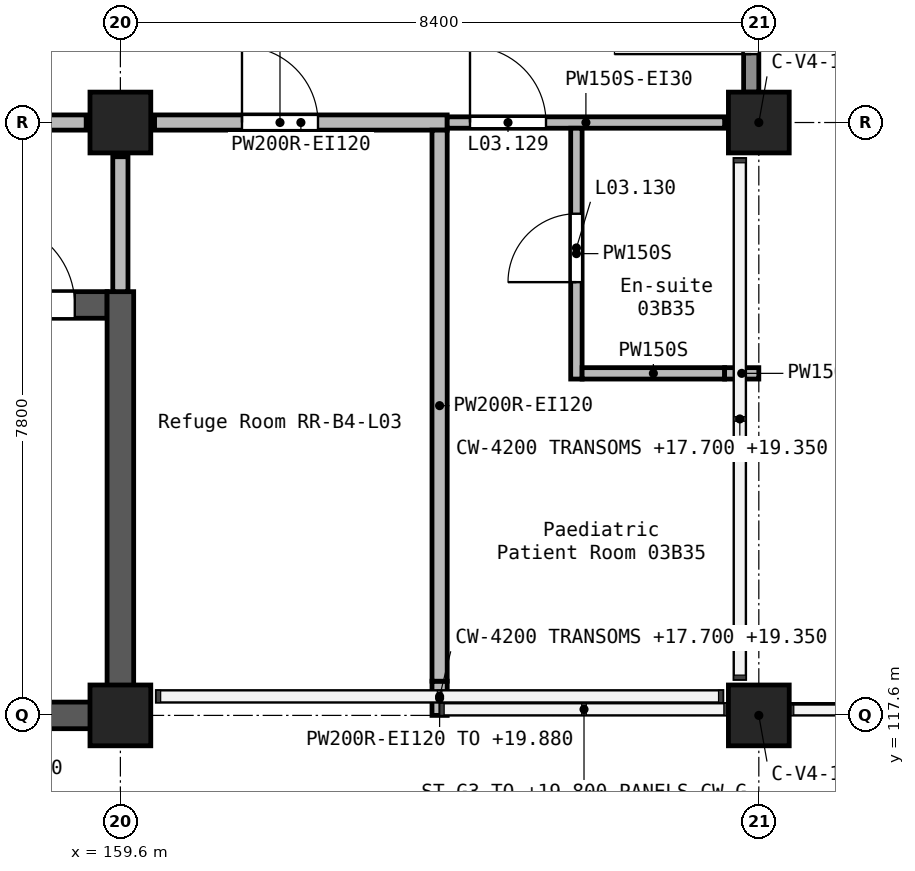
"""IFC4 building model, lengths in metres.
Left out: names, types, materials, properties, quantities, classifications, styles, units other than length and angle.
Written with IfcOpenShell. Run it as: python <this file> out.ifc"""

import sys

from ifc_helpers import new_model, si_unit, direction, frame, frame_2d, origin, origin_2d, place, context, subcontext, project, spatial, rectangle, extrude, element, fill, save


model = new_model("IFC4")
c1 = context("Model", 3, precision=1e-05, world=origin(), true_north=direction((0.0, 1.0)))
c2 = subcontext(c1, "Body", "Model", "MODEL_VIEW")
j1 = project(units=[si_unit("LENGTHUNIT", "METRE"), si_unit("PLANEANGLEUNIT", "RADIAN")], contexts=[c1])
p1 = place(None, origin())
s1 = spatial("IfcSite", under=j1, at=p1, CompositionType="ELEMENT")
p2 = place(p1, origin())
s2 = spatial("IfcBuilding", under=s1, at=p2, CompositionType="ELEMENT")
p3 = place(p2, frame((0.0, 0.0, 16.8)))
s3 = spatial("IfcBuildingStorey", under=s2, at=p3, CompositionType="ELEMENT", Elevation=16.8)
for number, where, z_axis, x_axis in (
    (1, (159.6, 117.6, 0.0), (0.0, 0.0, 1.0), (1.0, 0.0, 0.0)),
    (2, (159.6, 125.4, 0.0), (0.0, 0.0, 1.0), (1.0, 0.0, 0.0)),
    (3, (168.0, 117.6, 0.0), (0.0, 0.0, 1.0), (1.0, 0.0, 0.0)),
    (4, (168.0, 125.4, 0.0), (0.0, 0.0, 1.0), (1.0, 0.0, 0.0)),
):
    element("IfcColumn", number, at=place(p3, frame(where, z_axis=z_axis, x_axis=x_axis)), inside=s3, PredefinedType="COLUMN", context=c2, shape_type="SweptSolid", body=[
        extrude(rectangle(XDim=0.8, YDim=0.8, at=origin_2d()), origin(), (0.0, 0.0, 1.0), 4.2),
    ])
p4 = place(p3, frame((151.025, 123.0, 0.0), z_axis=(0.0, 0.0, 1.0), x_axis=(1.0, 0.0, 0.0)))
e5 = element("IfcWall", 5, at=p4, inside=s3, PredefinedType="SHEAR", context=c2, shape_type="SweptSolid", body=[
    extrude(rectangle(XDim=8.4, YDim=0.35, at=frame_2d((4.2, 0.0))), origin(), (0.0, 0.0, 1.0), 4.2),
])
p5 = place(p4, frame((6.875, 0.0, 0.0)))
e6 = element("IfcOpeningElement", 6, at=p5, cuts=e5, PredefinedType="OPENING", context=c2, shape_type="SweptSolid", body=[
    extrude(rectangle(XDim=1.1, YDim=2.1, at=frame_2d((0.55, 1.05))), frame((0.0, 0.185, 0.0), z_axis=(0.0, -1.0, 0.0), x_axis=(1.0, 0.0, 0.0)), (0.0, 0.0, 1.0), 0.37),
])
p6 = place(p3, frame((151.375, 117.6, 0.0), z_axis=(0.0, 0.0, 1.0), x_axis=(1.0, 0.0, 0.0)))
e7 = element("IfcWall", 7, at=p6, inside=s3, PredefinedType="SHEAR", context=c2, shape_type="SweptSolid", body=[
    extrude(rectangle(XDim=8.05, YDim=0.35, at=frame_2d((4.025, 0.0))), origin(), (0.0, 0.0, 1.0), 4.2),
])
p7 = place(p3, frame((159.6, 117.425, 0.0), z_axis=(0.0, 0.0, 1.0), x_axis=(0.0, 1.0, 0.0)))
e8 = element("IfcWall", 8, at=p7, inside=s3, PredefinedType="SHEAR", context=c2, shape_type="SweptSolid", body=[
    extrude(rectangle(XDim=5.75, YDim=0.35, at=frame_2d((2.875, 0.0))), origin(), (0.0, 0.0, 1.0), 4.2),
])
p8 = place(p3, frame((167.9, 125.8, 0.0), z_axis=(0.0, 0.0, 1.0), x_axis=(0.0, 1.0, 0.0)))
e9 = element("IfcWall", 9, at=p8, inside=s3, PredefinedType="STANDARD", context=c2, shape_type="SweptSolid", body=[
    extrude(rectangle(XDim=2.8, YDim=0.2, at=frame_2d((1.4, 0.0))), origin(), (0.0, 0.0, 1.0), 3.05),
])
p9 = place(p8, frame((0.5, 0.0, 0.0)))
e10 = element("IfcOpeningElement", 10, at=p9, cuts=e9, PredefinedType="OPENING", context=c2, shape_type="SweptSolid", body=[
    extrude(rectangle(XDim=1.8, YDim=2.4, at=frame_2d((0.9, 1.2))), frame((0.0, 0.11, 0.0), z_axis=(0.0, -1.0, 0.0), x_axis=(1.0, 0.0, 0.0)), (0.0, 0.0, 1.0), 0.22),
])
p10 = place(p3, frame((151.65, 125.4, 0.0), z_axis=(0.0, 0.0, 1.0), x_axis=(1.0, 0.0, 0.0)))
e11 = element("IfcWall", 11, at=p10, inside=s3, PredefinedType="SOLIDWALL", context=c2, shape_type="SweptSolid", body=[
    extrude(rectangle(XDim=7.5, YDim=0.2, at=frame_2d((3.75, 0.0))), origin(), (0.0, 0.0, 1.0), 3.9),
])
p11 = place(p10, frame((3.2, 0.0, 0.0)))
e12 = element("IfcOpeningElement", 12, at=p11, cuts=e11, PredefinedType="OPENING", context=c2, shape_type="SweptSolid", body=[
    extrude(rectangle(XDim=1.1, YDim=2.1, at=frame_2d((0.55, 1.05))), frame((0.0, 0.11, 0.0), z_axis=(0.0, -1.0, 0.0), x_axis=(1.0, 0.0, 0.0)), (0.0, 0.0, 1.0), 0.22),
])
p12 = place(p3, frame((160.05, 125.4, 0.0), z_axis=(0.0, 0.0, 1.0), x_axis=(1.0, 0.0, 0.0)))
e13 = element("IfcWall", 13, at=p12, inside=s3, PredefinedType="SOLIDWALL", context=c2, shape_type="SweptSolid", body=[
    extrude(rectangle(XDim=3.85, YDim=0.2, at=frame_2d((1.925, 0.0))), origin(), (0.0, 0.0, 1.0), 3.9),
])
p13 = place(p12, frame((1.15, 0.0, 0.0)))
e14 = element("IfcOpeningElement", 14, at=p13, cuts=e13, PredefinedType="OPENING", context=c2, shape_type="SweptSolid", body=[
    extrude(rectangle(XDim=1.0, YDim=2.1, at=frame_2d((0.5, 1.05))), frame((0.0, 0.11, 0.0), z_axis=(0.0, -1.0, 0.0), x_axis=(1.0, 0.0, 0.0)), (0.0, 0.0, 1.0), 0.22),
])
p14 = place(p3, frame((159.6, 123.175, 0.0), z_axis=(0.0, 0.0, 1.0), x_axis=(0.0, 1.0, 0.0)))
e15 = element("IfcWall", 15, at=p14, inside=s3, PredefinedType="SOLIDWALL", context=c2, shape_type="SweptSolid", body=[
    extrude(rectangle(XDim=1.775, YDim=0.2, at=frame_2d((0.887, 0.0))), origin(), (0.0, 0.0, 1.0), 3.9),
])
p15 = place(p3, frame((163.8, 117.6, 0.0), z_axis=(0.0, 0.0, 1.0), x_axis=(0.0, 1.0, 0.0)))
e16 = element("IfcWall", 16, at=p15, inside=s3, PredefinedType="SOLIDWALL", context=c2, shape_type="SweptSolid", body=[
    extrude(rectangle(XDim=0.45, YDim=0.2, at=frame_2d((0.225, 0.0))), origin(), (0.0, 0.0, 1.0), 3.08),
])
p16 = place(p3, frame((163.8, 118.05, 0.0), z_axis=(0.0, 0.0, 1.0), x_axis=(0.0, 1.0, 0.0)))
e17 = element("IfcWall", 17, at=p16, inside=s3, PredefinedType="SOLIDWALL", context=c2, shape_type="SweptSolid", body=[
    extrude(rectangle(XDim=7.25, YDim=0.2, at=frame_2d((3.625, 0.0))), origin(), (0.0, 0.0, 1.0), 3.9),
])
p17 = place(p3, frame((163.9, 125.4, 0.0), z_axis=(0.0, 0.0, 1.0), x_axis=(1.0, 0.0, 0.0)))
e18 = element("IfcWall", 18, at=p17, inside=s3, PredefinedType="PARTITIONING", context=c2, shape_type="SweptSolid", body=[
    extrude(rectangle(XDim=3.65, YDim=0.15, at=frame_2d((1.825, 0.0))), origin(), (0.0, 0.0, 1.0), 3.9),
])
p18 = place(p17, frame((0.3, 0.0, 0.0)))
e19 = element("IfcOpeningElement", 19, at=p18, cuts=e18, PredefinedType="OPENING", context=c2, shape_type="SweptSolid", body=[
    extrude(rectangle(XDim=1.0, YDim=2.1, at=frame_2d((0.5, 1.05))), frame((0.0, 0.085, 0.0), z_axis=(0.0, -1.0, 0.0), x_axis=(1.0, 0.0, 0.0)), (0.0, 0.0, 1.0), 0.17),
])
p19 = place(p3, frame((165.6, 122.025, 0.0), z_axis=(0.0, 0.0, 1.0), x_axis=(0.0, 1.0, 0.0)))
e20 = element("IfcWall", 20, at=p19, inside=s3, PredefinedType="PARTITIONING", context=c2, shape_type="SweptSolid", body=[
    extrude(rectangle(XDim=3.3, YDim=0.15, at=frame_2d((1.65, 0.0))), origin(), (0.0, 0.0, 1.0), 3.9),
])
p20 = place(p19, frame((1.275, 0.0, 0.0)))
e21 = element("IfcOpeningElement", 21, at=p20, cuts=e20, PredefinedType="OPENING", context=c2, shape_type="SweptSolid", body=[
    extrude(rectangle(XDim=0.9, YDim=2.1, at=frame_2d((0.45, 1.05))), frame((0.0, 0.085, 0.0), z_axis=(0.0, -1.0, 0.0), x_axis=(1.0, 0.0, 0.0)), (0.0, 0.0, 1.0), 0.17),
])
p21 = place(p3, frame((165.675, 122.1, 0.0), z_axis=(0.0, 0.0, 1.0), x_axis=(1.0, 0.0, 0.0)))
e22 = element("IfcWall", 22, at=p21, inside=s3, PredefinedType="PARTITIONING", context=c2, shape_type="SweptSolid", body=[
    extrude(rectangle(XDim=1.875, YDim=0.15, at=frame_2d((0.938, 0.0))), origin(), (0.0, 0.0, 1.0), 3.9),
])
p22 = place(p3, frame((167.55, 122.1, 0.0), z_axis=(0.0, 0.0, 1.0), x_axis=(1.0, 0.0, 0.0)))
e23 = element("IfcWall", 23, at=p22, inside=s3, PredefinedType="PARTITIONING", context=c2, shape_type="SweptSolid", body=[
    extrude(rectangle(XDim=0.45, YDim=0.15, at=frame_2d((0.225, 0.0))), origin(), (0.0, 0.0, 1.0), 3.08),
])
p23 = place(p9, frame((1.8, 0.0, 0.0), z_axis=(0.0, 0.0, 1.0), x_axis=(-1.0, 0.0, 0.0)))
e24 = element("IfcDoor", 24, at=p23, inside=s3, OperationType="SINGLE_SWING_LEFT", PredefinedType="DOOR", context=c2, shape_type="SweptSolid", body=[
    extrude(rectangle(XDim=1.8, YDim=2.4, at=frame_2d((0.9, 1.2))), frame((0.0, 0.025, 0.0), z_axis=(0.0, -1.0, 0.0), x_axis=(1.0, 0.0, 0.0)), (0.0, 0.0, 1.0), 0.05),
])
fill(e10, e24)
p24 = place(p18, frame((1.0, 0.0, 0.0), z_axis=(0.0, 0.0, 1.0), x_axis=(-1.0, 0.0, 0.0)))
e25 = element("IfcDoor", 25, at=p24, inside=s3, OperationType="SINGLE_SWING_RIGHT", PredefinedType="DOOR", context=c2, shape_type="SweptSolid", body=[
    extrude(rectangle(XDim=1.0, YDim=2.1, at=frame_2d((0.5, 1.05))), frame((0.0, 0.025, 0.0), z_axis=(0.0, -1.0, 0.0), x_axis=(1.0, 0.0, 0.0)), (0.0, 0.0, 1.0), 0.05),
])
fill(e19, e25)
p25 = place(p20, frame((0.9, 0.0, 0.0), z_axis=(0.0, 0.0, 1.0), x_axis=(-1.0, 0.0, 0.0)))
e26 = element("IfcDoor", 26, at=p25, inside=s3, OperationType="SINGLE_SWING_LEFT", PredefinedType="DOOR", context=c2, shape_type="SweptSolid", body=[
    extrude(rectangle(XDim=0.9, YDim=2.1, at=frame_2d((0.45, 1.05))), frame((0.0, 0.025, 0.0), z_axis=(0.0, -1.0, 0.0), x_axis=(1.0, 0.0, 0.0)), (0.0, 0.0, 1.0), 0.05),
])
fill(e21, e26)
p26 = place(p13, frame((1.0, 0.0, 0.0), z_axis=(0.0, 0.0, 1.0), x_axis=(-1.0, 0.0, 0.0)))
e27 = element("IfcDoor", 27, at=p26, inside=s3, OperationType="SINGLE_SWING_RIGHT", PredefinedType="DOOR", context=c2, shape_type="SweptSolid", body=[
    extrude(rectangle(XDim=1.0, YDim=2.1, at=frame_2d((0.5, 1.05))), frame((0.0, 0.025, 0.0), z_axis=(0.0, -1.0, 0.0), x_axis=(1.0, 0.0, 0.0)), (0.0, 0.0, 1.0), 0.05),
])
fill(e14, e27)
p27 = place(p5, frame((1.1, 0.0, 0.0), z_axis=(0.0, 0.0, 1.0), x_axis=(-1.0, 0.0, 0.0)))
e28 = element("IfcDoor", 28, at=p27, inside=s3, OperationType="SINGLE_SWING_LEFT", PredefinedType="DOOR", context=c2, shape_type="SweptSolid", body=[
    extrude(rectangle(XDim=1.1, YDim=2.1, at=frame_2d((0.55, 1.05))), frame((0.0, 0.025, 0.0), z_axis=(0.0, -1.0, 0.0), x_axis=(1.0, 0.0, 0.0)), (0.0, 0.0, 1.0), 0.05),
])
fill(e6, e28)
save(model, sys.argv[1])
